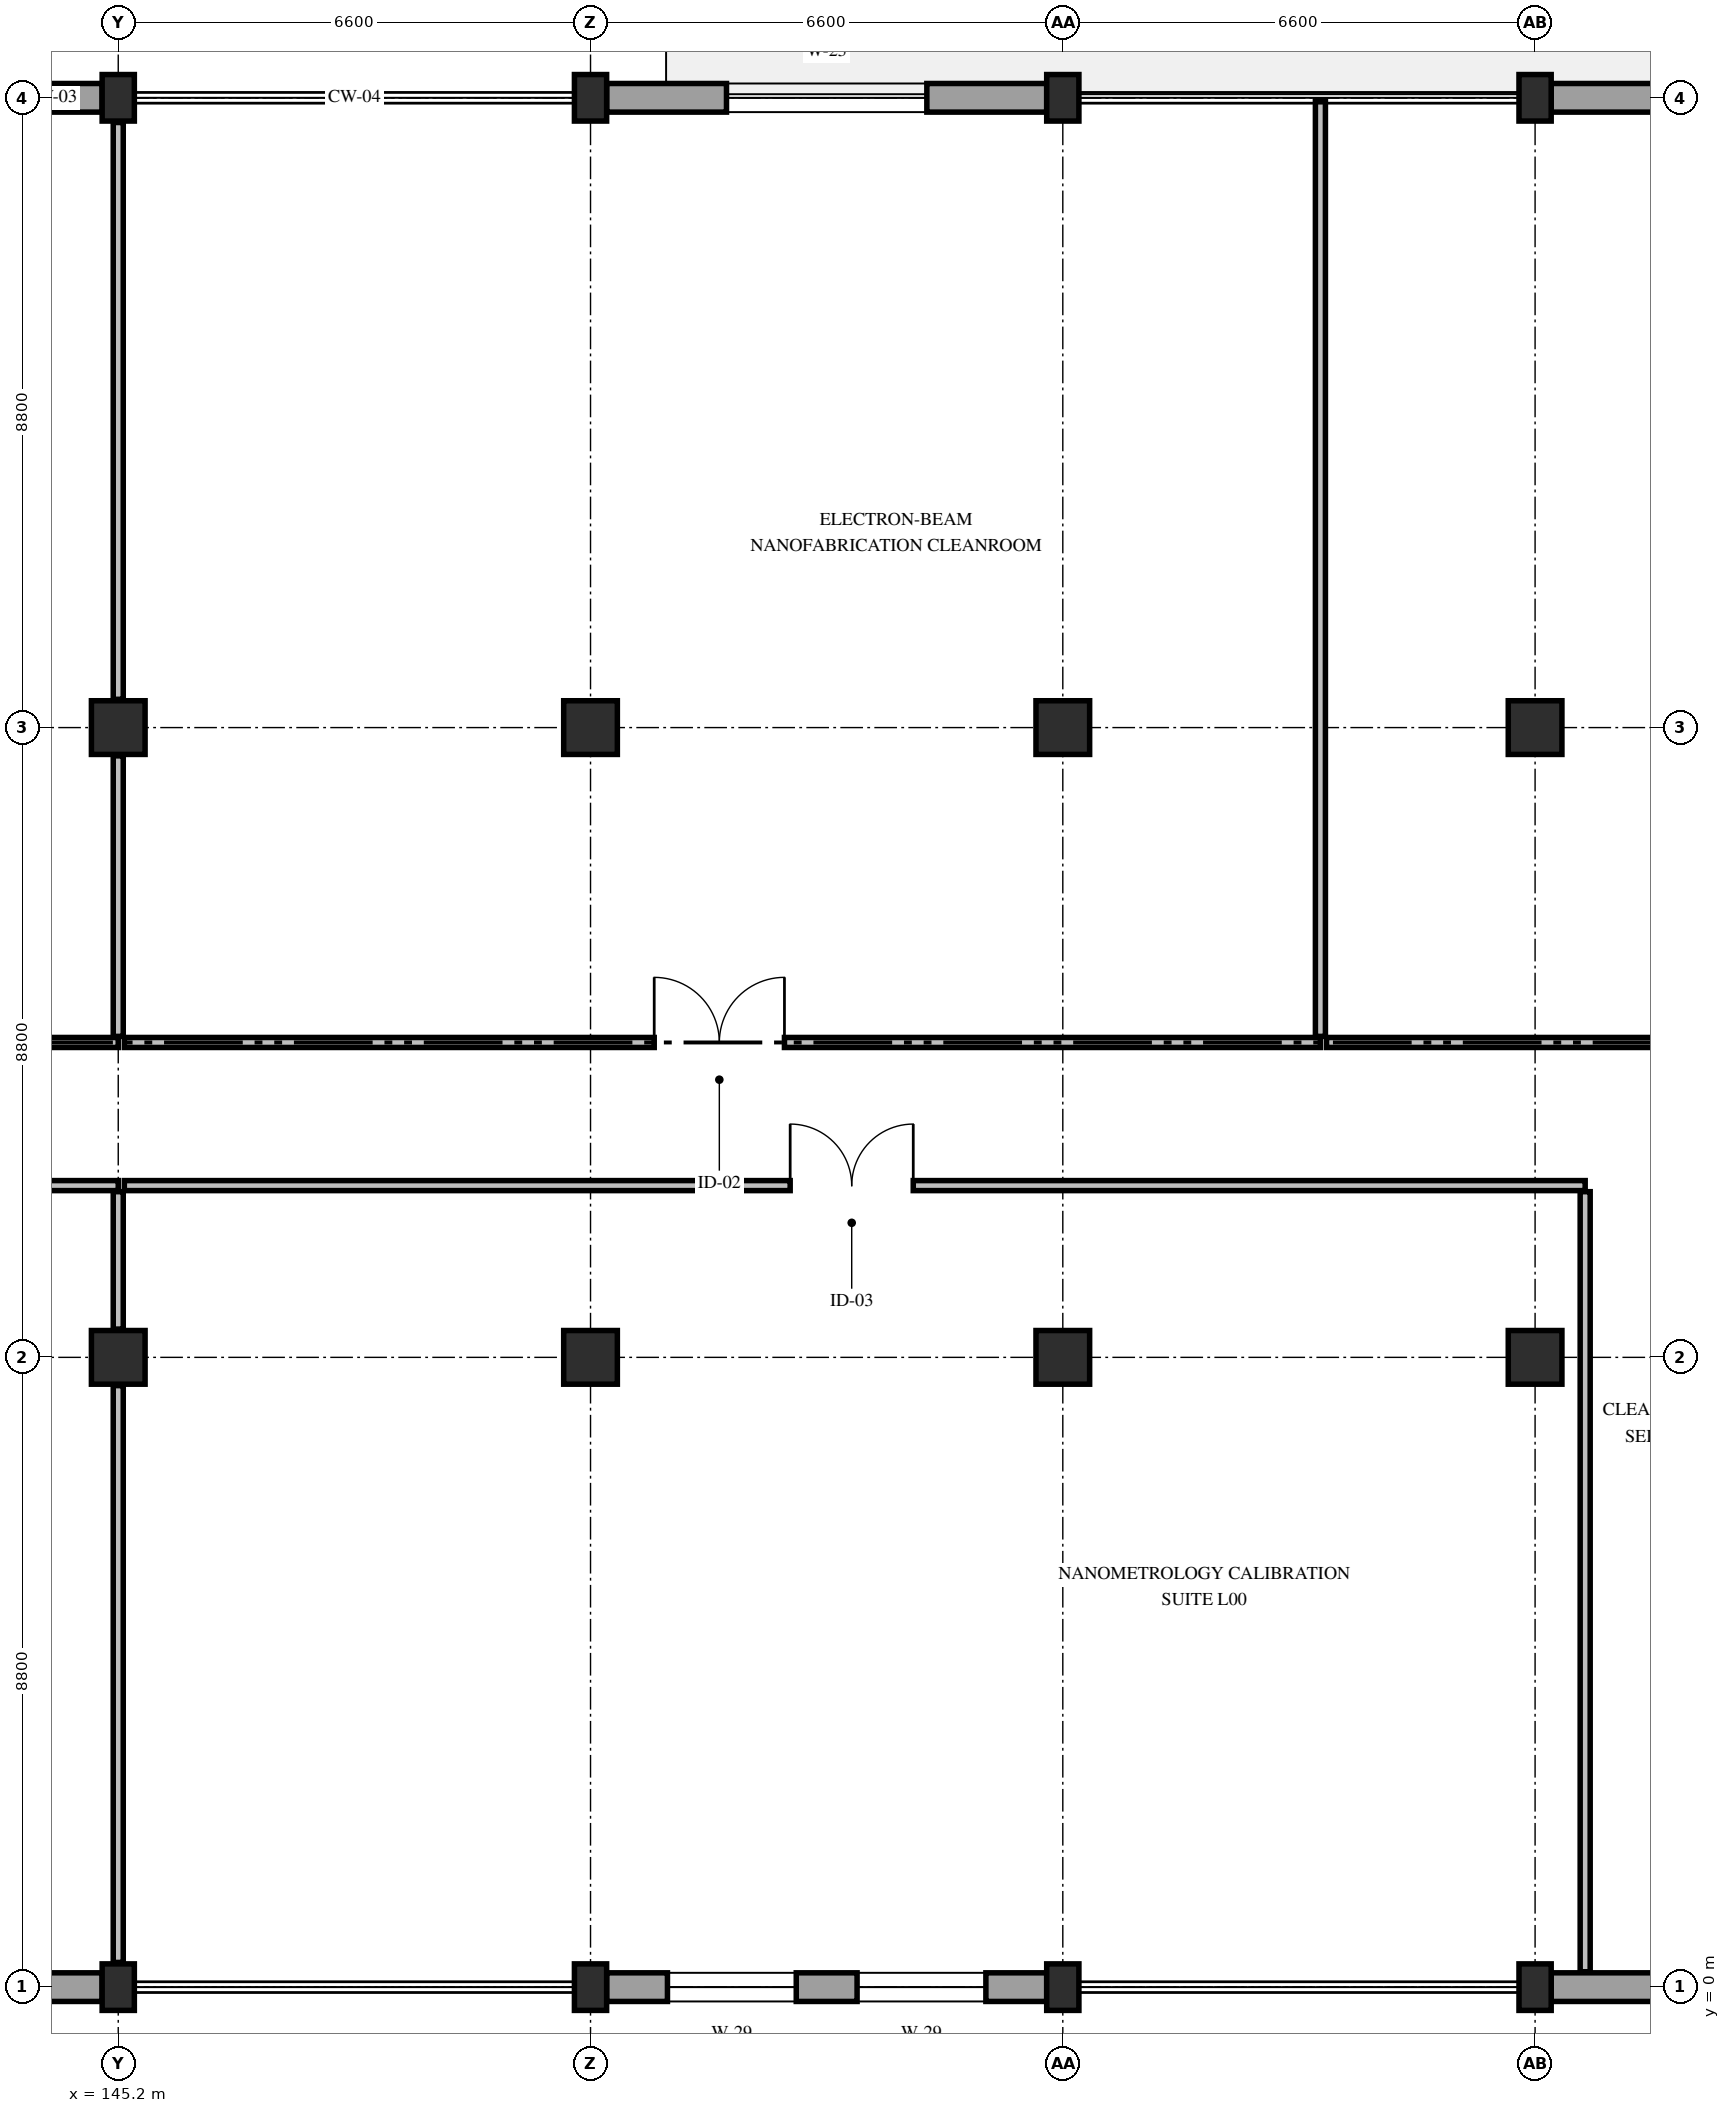
"""IFC4 building model, lengths in metres.
Left out: names, types, materials, properties, quantities, classifications, styles, units other than length and angle.
Written with IfcOpenShell. Run it as: python <this file> out.ifc"""

import sys

from ifc_helpers import new_model, si_unit, direction, frame, frame_2d, origin, origin_2d, place, context, subcontext, project, spatial, rectangle, extrude, element, fill, save


model = new_model("IFC4")
c1 = context("Model", 3, precision=1e-05, world=origin(), true_north=direction((0.0, 1.0)))
c2 = subcontext(c1, "Body", "Model", "MODEL_VIEW")
j1 = project(units=[si_unit("LENGTHUNIT", "METRE"), si_unit("PLANEANGLEUNIT", "RADIAN")], contexts=[c1])
p1 = place(None, origin())
s1 = spatial("IfcSite", under=j1, at=p1, CompositionType="ELEMENT")
p2 = place(p1, origin())
s2 = spatial("IfcBuilding", under=s1, at=p2, CompositionType="ELEMENT")
p3 = place(p2, origin())
s3 = spatial("IfcBuildingStorey", under=s2, at=p3, CompositionType="ELEMENT", Elevation=0.0)
p4 = place(p3, frame((145.2, 0.0, 0.0), z_axis=(0.0, 0.0, 1.0), x_axis=(1.0, 0.0, 0.0)))
e1 = element("IfcColumn", 1, at=p4, inside=s3, PredefinedType="PILASTER", context=c2, shape_type="SweptSolid", body=[
    extrude(rectangle(XDim=0.45, YDim=0.65, at=origin_2d()), origin(), (0.0, 0.0, 1.0), 5.4),
])
for number, where, z_axis, x_axis in (
    (2, (145.2, 8.8, 0.0), (0.0, 0.0, 1.0), (1.0, 0.0, 0.0)),
    (3, (145.2, 17.6, 0.0), (0.0, 0.0, 1.0), (1.0, 0.0, 0.0)),
):
    element("IfcColumn", number, at=place(p3, frame(where, z_axis=z_axis, x_axis=x_axis)), inside=s3, PredefinedType="COLUMN", context=c2, shape_type="SweptSolid", body=[
        extrude(rectangle(XDim=0.75, YDim=0.75, at=origin_2d()), origin(), (0.0, 0.0, 1.0), 5.4),
    ])
for number, where, z_axis, x_axis in (
    (4, (145.2, 26.4, 0.0), (0.0, 0.0, 1.0), (1.0, 0.0, 0.0)),
    (5, (151.8, 0.0, 0.0), (0.0, 0.0, 1.0), (1.0, 0.0, 0.0)),
):
    element("IfcColumn", number, at=place(p3, frame(where, z_axis=z_axis, x_axis=x_axis)), inside=s3, PredefinedType="PILASTER", context=c2, shape_type="SweptSolid", body=[
        extrude(rectangle(XDim=0.45, YDim=0.65, at=origin_2d()), origin(), (0.0, 0.0, 1.0), 5.4),
    ])
for number, where, z_axis, x_axis in (
    (6, (151.8, 8.8, 0.0), (0.0, 0.0, 1.0), (1.0, 0.0, 0.0)),
    (7, (151.8, 17.6, 0.0), (0.0, 0.0, 1.0), (1.0, 0.0, 0.0)),
):
    element("IfcColumn", number, at=place(p3, frame(where, z_axis=z_axis, x_axis=x_axis)), inside=s3, PredefinedType="COLUMN", context=c2, shape_type="SweptSolid", body=[
        extrude(rectangle(XDim=0.75, YDim=0.75, at=origin_2d()), origin(), (0.0, 0.0, 1.0), 5.4),
    ])
for number, where, z_axis, x_axis in (
    (8, (151.8, 26.4, 0.0), (0.0, 0.0, 1.0), (1.0, 0.0, 0.0)),
    (9, (158.4, 0.0, 0.0), (0.0, 0.0, 1.0), (1.0, 0.0, 0.0)),
):
    element("IfcColumn", number, at=place(p3, frame(where, z_axis=z_axis, x_axis=x_axis)), inside=s3, PredefinedType="PILASTER", context=c2, shape_type="SweptSolid", body=[
        extrude(rectangle(XDim=0.45, YDim=0.65, at=origin_2d()), origin(), (0.0, 0.0, 1.0), 5.4),
    ])
for number, where, z_axis, x_axis in (
    (10, (158.4, 8.8, 0.0), (0.0, 0.0, 1.0), (1.0, 0.0, 0.0)),
    (11, (158.4, 17.6, 0.0), (0.0, 0.0, 1.0), (1.0, 0.0, 0.0)),
):
    element("IfcColumn", number, at=place(p3, frame(where, z_axis=z_axis, x_axis=x_axis)), inside=s3, PredefinedType="COLUMN", context=c2, shape_type="SweptSolid", body=[
        extrude(rectangle(XDim=0.75, YDim=0.75, at=origin_2d()), origin(), (0.0, 0.0, 1.0), 5.4),
    ])
for number, where, z_axis, x_axis in (
    (12, (158.4, 26.4, 0.0), (0.0, 0.0, 1.0), (1.0, 0.0, 0.0)),
    (13, (165.0, 0.0, 0.0), (0.0, 0.0, 1.0), (1.0, 0.0, 0.0)),
):
    element("IfcColumn", number, at=place(p3, frame(where, z_axis=z_axis, x_axis=x_axis)), inside=s3, PredefinedType="PILASTER", context=c2, shape_type="SweptSolid", body=[
        extrude(rectangle(XDim=0.45, YDim=0.65, at=origin_2d()), origin(), (0.0, 0.0, 1.0), 5.4),
    ])
for number, where, z_axis, x_axis in (
    (14, (165.0, 8.8, 0.0), (0.0, 0.0, 1.0), (1.0, 0.0, 0.0)),
    (15, (165.0, 17.6, 0.0), (0.0, 0.0, 1.0), (1.0, 0.0, 0.0)),
):
    element("IfcColumn", number, at=place(p3, frame(where, z_axis=z_axis, x_axis=x_axis)), inside=s3, PredefinedType="COLUMN", context=c2, shape_type="SweptSolid", body=[
        extrude(rectangle(XDim=0.75, YDim=0.75, at=origin_2d()), origin(), (0.0, 0.0, 1.0), 5.4),
    ])
p5 = place(p3, frame((165.0, 26.4, 0.0), z_axis=(0.0, 0.0, 1.0), x_axis=(1.0, 0.0, 0.0)))
e16 = element("IfcColumn", 16, at=p5, inside=s3, PredefinedType="PILASTER", context=c2, shape_type="SweptSolid", body=[
    extrude(rectangle(XDim=0.45, YDim=0.65, at=origin_2d()), origin(), (0.0, 0.0, 1.0), 5.4),
])
p6 = place(p3, frame((138.825, 26.4, 0.0), z_axis=(0.0, 0.0, 1.0), x_axis=(1.0, 0.0, 0.0)))
e17 = element("IfcWall", 17, at=p6, inside=s3, PredefinedType="STANDARD", context=c2, shape_type="SweptSolid", body=[
    extrude(rectangle(XDim=6.15, YDim=0.4, at=frame_2d((3.075, 0.0))), origin(), (0.0, 0.0, 1.0), 4.548),
])
p7 = place(p6, frame((1.675, 0.0, 0.85)))
e18 = element("IfcOpeningElement", 18, at=p7, cuts=e17, PredefinedType="OPENING", context=c2, shape_type="SweptSolid", body=[
    extrude(rectangle(XDim=2.8, YDim=1.7, at=frame_2d((1.4, 0.85))), frame((0.0, 0.215, 0.0), z_axis=(0.0, -1.0, 0.0), x_axis=(1.0, 0.0, 0.0)), (0.0, 0.0, 1.0), 0.43),
])
p8 = place(p3, frame((152.025, 26.4, 0.0), z_axis=(0.0, 0.0, 1.0), x_axis=(1.0, 0.0, 0.0)))
e19 = element("IfcWall", 19, at=p8, inside=s3, PredefinedType="STANDARD", context=c2, shape_type="SweptSolid", body=[
    extrude(rectangle(XDim=6.15, YDim=0.4, at=frame_2d((3.075, 0.0))), origin(), (0.0, 0.0, 1.0), 4.58),
])
p9 = place(p8, frame((1.675, 0.0, 0.85)))
e20 = element("IfcOpeningElement", 20, at=p9, cuts=e19, PredefinedType="OPENING", context=c2, shape_type="SweptSolid", body=[
    extrude(rectangle(XDim=2.8, YDim=1.7, at=frame_2d((1.4, 0.85))), frame((0.0, 0.215, 0.0), z_axis=(0.0, -1.0, 0.0), x_axis=(1.0, 0.0, 0.0)), (0.0, 0.0, 1.0), 0.43),
])
p10 = place(p3, frame((165.225, 26.4, 0.0), z_axis=(0.0, 0.0, 1.0), x_axis=(1.0, 0.0, 0.0)))
e21 = element("IfcWall", 21, at=p10, inside=s3, PredefinedType="STANDARD", context=c2, shape_type="SweptSolid", body=[
    extrude(rectangle(XDim=6.15, YDim=0.4, at=frame_2d((3.075, 0.0))), origin(), (0.0, 0.0, 1.0), 4.58),
])
p11 = place(p10, frame((2.125, 0.0, 0.0)))
e22 = element("IfcOpeningElement", 22, at=p11, cuts=e21, PredefinedType="OPENING", context=c2, shape_type="SweptSolid", body=[
    extrude(rectangle(XDim=1.9, YDim=2.4, at=frame_2d((0.95, 1.2))), frame((0.0, 0.215, 0.0), z_axis=(0.0, -1.0, 0.0), x_axis=(1.0, 0.0, 0.0)), (0.0, 0.0, 1.0), 0.43),
])
p12 = place(p3, frame((171.375, 0.0, 0.0), z_axis=(0.0, 0.0, 1.0), x_axis=(-1.0, 0.0, 0.0)))
e23 = element("IfcWall", 23, at=p12, inside=s3, PredefinedType="STANDARD", context=c2, shape_type="SweptSolid", body=[
    extrude(rectangle(XDim=6.15, YDim=0.4, at=frame_2d((3.075, 0.0))), origin(), (0.0, 0.0, 1.0), 4.58),
])
p13 = place(p12, frame((2.175, 0.0, 0.0)))
e24 = element("IfcOpeningElement", 24, at=p13, cuts=e23, PredefinedType="OPENING", context=c2, shape_type="SweptSolid", body=[
    extrude(rectangle(XDim=1.8, YDim=2.35, at=frame_2d((0.9, 1.175))), frame((0.0, 0.215, 0.0), z_axis=(0.0, -1.0, 0.0), x_axis=(1.0, 0.0, 0.0)), (0.0, 0.0, 1.0), 0.43),
])
p14 = place(p3, frame((158.175, 0.0, 0.0), z_axis=(0.0, 0.0, 1.0), x_axis=(-1.0, 0.0, 0.0)))
e25 = element("IfcWall", 25, at=p14, inside=s3, PredefinedType="STANDARD", context=c2, shape_type="SweptSolid", body=[
    extrude(rectangle(XDim=6.15, YDim=0.4, at=frame_2d((3.075, 0.0))), origin(), (0.0, 0.0, 1.0), 4.58),
])
p15 = place(p14, frame((0.85, 0.0, 0.85)))
e26 = element("IfcOpeningElement", 26, at=p15, cuts=e25, PredefinedType="OPENING", context=c2, shape_type="SweptSolid", body=[
    extrude(rectangle(XDim=1.8, YDim=2.04, at=frame_2d((0.9, 1.02))), frame((0.0, 0.215, 0.0), z_axis=(0.0, -1.0, 0.0), x_axis=(1.0, 0.0, 0.0)), (0.0, 0.0, 1.0), 0.43),
])
p16 = place(p14, frame((3.5, 0.0, 0.85)))
e27 = element("IfcOpeningElement", 27, at=p16, cuts=e25, PredefinedType="OPENING", context=c2, shape_type="SweptSolid", body=[
    extrude(rectangle(XDim=1.8, YDim=2.04, at=frame_2d((0.9, 1.02))), frame((0.0, 0.215, 0.0), z_axis=(0.0, -1.0, 0.0), x_axis=(1.0, 0.0, 0.0)), (0.0, 0.0, 1.0), 0.43),
])
p17 = place(p3, frame((144.975, 0.0, 0.0), z_axis=(0.0, 0.0, 1.0), x_axis=(-1.0, 0.0, 0.0)))
e28 = element("IfcWall", 28, at=p17, inside=s3, PredefinedType="STANDARD", context=c2, shape_type="SweptSolid", body=[
    extrude(rectangle(XDim=6.15, YDim=0.4, at=frame_2d((3.075, 0.0))), origin(), (0.0, 0.0, 1.0), 4.58),
])
p18 = place(p17, frame((0.85, 0.0, 0.85)))
e29 = element("IfcOpeningElement", 29, at=p18, cuts=e28, PredefinedType="OPENING", context=c2, shape_type="SweptSolid", body=[
    extrude(rectangle(XDim=1.8, YDim=2.04, at=frame_2d((0.9, 1.02))), frame((0.0, 0.215, 0.0), z_axis=(0.0, -1.0, 0.0), x_axis=(1.0, 0.0, 0.0)), (0.0, 0.0, 1.0), 0.43),
])
p19 = place(p17, frame((3.5, 0.0, 0.85)))
e30 = element("IfcOpeningElement", 30, at=p19, cuts=e28, PredefinedType="OPENING", context=c2, shape_type="SweptSolid", body=[
    extrude(rectangle(XDim=1.8, YDim=2.04, at=frame_2d((0.9, 1.02))), frame((0.0, 0.215, 0.0), z_axis=(0.0, -1.0, 0.0), x_axis=(1.0, 0.0, 0.0)), (0.0, 0.0, 1.0), 0.43),
])
p20 = place(p3, frame((118.885, 13.2, 0.0), z_axis=(0.0, 0.0, 1.0), x_axis=(1.0, 0.0, 0.0)))
e31 = element("IfcWall", 31, at=p20, inside=s3, PredefinedType="PARTITIONING", context=c2, shape_type="SweptSolid", body=[
    extrude(rectangle(XDim=26.315, YDim=0.14, at=frame_2d((13.157, 0.0))), origin(), (0.0, 0.0, 1.0), 4.665),
])
p21 = place(p20, frame((13.805, 0.0, 0.0)))
e32 = element("IfcOpeningElement", 32, at=p21, cuts=e31, PredefinedType="OPENING", context=c2, shape_type="SweptSolid", body=[
    extrude(rectangle(XDim=1.72, YDim=2.35, at=frame_2d((0.86, 1.175))), frame((0.0, 0.085, 0.0), z_axis=(0.0, -1.0, 0.0), x_axis=(1.0, 0.0, 0.0)), (0.0, 0.0, 1.0), 0.17),
])
p22 = place(p3, frame((145.2, 13.285, 0.0), z_axis=(0.0, 0.0, 1.0), x_axis=(0.0, 1.0, 0.0)))
e33 = element("IfcWall", 33, at=p22, inside=s3, PredefinedType="PARTITIONING", context=c2, shape_type="SweptSolid", body=[
    extrude(rectangle(XDim=3.92, YDim=0.14, at=frame_2d((1.96, 0.0))), origin(), (0.0, 0.0, 1.0), 4.665),
])
p23 = place(p3, frame((145.2, 17.995, 0.0), z_axis=(0.0, 0.0, 1.0), x_axis=(0.0, 1.0, 0.0)))
e34 = element("IfcWall", 34, at=p23, inside=s3, PredefinedType="PARTITIONING", context=c2, shape_type="SweptSolid", body=[
    extrude(rectangle(XDim=8.06, YDim=0.14, at=frame_2d((4.03, 0.0))), origin(), (0.0, 0.0, 1.0), 4.665),
])
p24 = place(p3, frame((145.285, 13.2, 0.0), z_axis=(0.0, 0.0, 1.0), x_axis=(1.0, 0.0, 0.0)))
e35 = element("IfcWall", 35, at=p24, inside=s3, PredefinedType="PARTITIONING", context=c2, shape_type="SweptSolid", body=[
    extrude(rectangle(XDim=16.715, YDim=0.14, at=frame_2d((8.357, 0.0))), origin(), (0.0, 0.0, 1.0), 4.665),
])
p25 = place(p24, frame((7.405, 0.0, 0.0)))
e36 = element("IfcOpeningElement", 36, at=p25, cuts=e35, PredefinedType="OPENING", context=c2, shape_type="SweptSolid", body=[
    extrude(rectangle(XDim=1.82, YDim=2.35, at=frame_2d((0.91, 1.175))), frame((0.0, 0.085, 0.0), z_axis=(0.0, -1.0, 0.0), x_axis=(1.0, 0.0, 0.0)), (0.0, 0.0, 1.0), 0.17),
])
p26 = place(p3, frame((162.0, 13.285, 0.0), z_axis=(0.0, 0.0, 1.0), x_axis=(0.0, 1.0, 0.0)))
e37 = element("IfcWall", 37, at=p26, inside=s3, PredefinedType="PARTITIONING", context=c2, shape_type="SweptSolid", body=[
    extrude(rectangle(XDim=13.075, YDim=0.14, at=frame_2d((6.538, 0.0))), origin(), (0.0, 0.0, 1.0), 4.58),
])
p27 = place(p3, frame((162.085, 13.2, 0.0), z_axis=(0.0, 0.0, 1.0), x_axis=(1.0, 0.0, 0.0)))
e38 = element("IfcWall", 38, at=p27, inside=s3, PredefinedType="PARTITIONING", context=c2, shape_type="SweptSolid", body=[
    extrude(rectangle(XDim=15.9, YDim=0.14, at=frame_2d((7.95, 0.0))), origin(), (0.0, 0.0, 1.0), 4.58),
])
p28 = place(p27, frame((7.015, 0.0, 0.0)))
e39 = element("IfcOpeningElement", 39, at=p28, cuts=e38, PredefinedType="OPENING", context=c2, shape_type="SweptSolid", body=[
    extrude(rectangle(XDim=1.72, YDim=2.35, at=frame_2d((0.86, 1.175))), frame((0.0, 0.085, 0.0), z_axis=(0.0, -1.0, 0.0), x_axis=(1.0, 0.0, 0.0)), (0.0, 0.0, 1.0), 0.17),
])
p29 = place(p3, frame((125.6, 11.2, 0.0), z_axis=(0.0, 0.0, 1.0), x_axis=(1.0, 0.0, 0.0)))
e40 = element("IfcWall", 40, at=p29, inside=s3, PredefinedType="PARTITIONING", context=c2, shape_type="SweptSolid", body=[
    extrude(rectangle(XDim=19.6, YDim=0.14, at=frame_2d((9.8, 0.0))), origin(), (0.0, 0.0, 1.0), 4.665),
])
p30 = place(p29, frame((8.89, 0.0, 0.0)))
e41 = element("IfcOpeningElement", 41, at=p30, cuts=e40, PredefinedType="OPENING", context=c2, shape_type="SweptSolid", body=[
    extrude(rectangle(XDim=1.82, YDim=2.35, at=frame_2d((0.91, 1.175))), frame((0.0, 0.085, 0.0), z_axis=(0.0, -1.0, 0.0), x_axis=(1.0, 0.0, 0.0)), (0.0, 0.0, 1.0), 0.17),
])
p31 = place(p3, frame((145.2, 0.345, 0.0), z_axis=(0.0, 0.0, 1.0), x_axis=(0.0, 1.0, 0.0)))
e42 = element("IfcWall", 42, at=p31, inside=s3, PredefinedType="PARTITIONING", context=c2, shape_type="SweptSolid", body=[
    extrude(rectangle(XDim=8.06, YDim=0.14, at=frame_2d((4.03, 0.0))), origin(), (0.0, 0.0, 1.0), 4.665),
])
p32 = place(p3, frame((145.2, 9.195, 0.0), z_axis=(0.0, 0.0, 1.0), x_axis=(0.0, 1.0, 0.0)))
e43 = element("IfcWall", 43, at=p32, inside=s3, PredefinedType="PARTITIONING", context=c2, shape_type="SweptSolid", body=[
    extrude(rectangle(XDim=1.92, YDim=0.14, at=frame_2d((0.96, 0.0))), origin(), (0.0, 0.0, 1.0), 4.665),
])
p33 = place(p3, frame((145.285, 11.2, 0.0), z_axis=(0.0, 0.0, 1.0), x_axis=(1.0, 0.0, 0.0)))
e44 = element("IfcWall", 44, at=p33, inside=s3, PredefinedType="PARTITIONING", context=c2, shape_type="SweptSolid", body=[
    extrude(rectangle(XDim=20.415, YDim=0.14, at=frame_2d((10.208, 0.0))), origin(), (0.0, 0.0, 1.0), 4.665),
])
p34 = place(p33, frame((9.305, 0.0, 0.0)))
e45 = element("IfcOpeningElement", 45, at=p34, cuts=e44, PredefinedType="OPENING", context=c2, shape_type="SweptSolid", body=[
    extrude(rectangle(XDim=1.72, YDim=2.35, at=frame_2d((0.86, 1.175))), frame((0.0, 0.085, 0.0), z_axis=(0.0, -1.0, 0.0), x_axis=(1.0, 0.0, 0.0)), (0.0, 0.0, 1.0), 0.17),
])
p35 = place(p3, frame((165.7, 0.215, 0.0), z_axis=(0.0, 0.0, 1.0), x_axis=(0.0, 1.0, 0.0)))
e46 = element("IfcWall", 46, at=p35, inside=s3, PredefinedType="PARTITIONING", context=c2, shape_type="SweptSolid", body=[
    extrude(rectangle(XDim=10.9, YDim=0.14, at=frame_2d((5.45, 0.0))), origin(), (0.0, 0.0, 1.0), 4.58),
])
p36 = place(p9, origin())
e47 = element("IfcWindow", 47, at=p36, inside=s3, PartitioningType="DOUBLE_PANEL_VERTICAL", PredefinedType="WINDOW", context=c2, shape_type="SweptSolid", body=[
    extrude(rectangle(XDim=2.8, YDim=1.7, at=frame_2d((1.4, 0.85))), frame((0.0, 0.03, 0.0), z_axis=(0.0, -1.0, 0.0), x_axis=(1.0, 0.0, 0.0)), (0.0, 0.0, 1.0), 0.06),
])
fill(e20, e47)
p37 = place(p15, origin())
e48 = element("IfcWindow", 48, at=p37, inside=s3, PartitioningType="DOUBLE_PANEL_VERTICAL", PredefinedType="WINDOW", context=c2, shape_type="SweptSolid", body=[
    extrude(rectangle(XDim=1.8, YDim=2.04, at=frame_2d((0.9, 1.02))), frame((0.0, 0.03, 0.0), z_axis=(0.0, -1.0, 0.0), x_axis=(1.0, 0.0, 0.0)), (0.0, 0.0, 1.0), 0.06),
])
fill(e26, e48)
p38 = place(p16, origin())
e49 = element("IfcWindow", 49, at=p38, inside=s3, PartitioningType="DOUBLE_PANEL_VERTICAL", PredefinedType="WINDOW", context=c2, shape_type="SweptSolid", body=[
    extrude(rectangle(XDim=1.8, YDim=2.04, at=frame_2d((0.9, 1.02))), frame((0.0, 0.03, 0.0), z_axis=(0.0, -1.0, 0.0), x_axis=(1.0, 0.0, 0.0)), (0.0, 0.0, 1.0), 0.06),
])
fill(e27, e49)
p39 = place(p25, origin())
e50 = element("IfcDoor", 50, at=p39, inside=s3, OperationType="DOUBLE_DOOR_SINGLE_SWING", PredefinedType="DOOR", context=c2, shape_type="SweptSolid", body=[
    extrude(rectangle(XDim=1.82, YDim=2.35, at=frame_2d((0.91, 1.175))), frame((0.0, 0.025, 0.0), z_axis=(0.0, -1.0, 0.0), x_axis=(1.0, 0.0, 0.0)), (0.0, 0.0, 1.0), 0.05),
])
fill(e36, e50)
p40 = place(p34, origin())
e51 = element("IfcDoor", 51, at=p40, inside=s3, OperationType="DOUBLE_DOOR_SINGLE_SWING", PredefinedType="DOOR", context=c2, shape_type="SweptSolid", body=[
    extrude(rectangle(XDim=1.72, YDim=2.35, at=frame_2d((0.86, 1.175))), frame((0.0, 0.025, 0.0), z_axis=(0.0, -1.0, 0.0), x_axis=(1.0, 0.0, 0.0)), (0.0, 0.0, 1.0), 0.05),
])
fill(e45, e51)
save(model, sys.argv[1])
